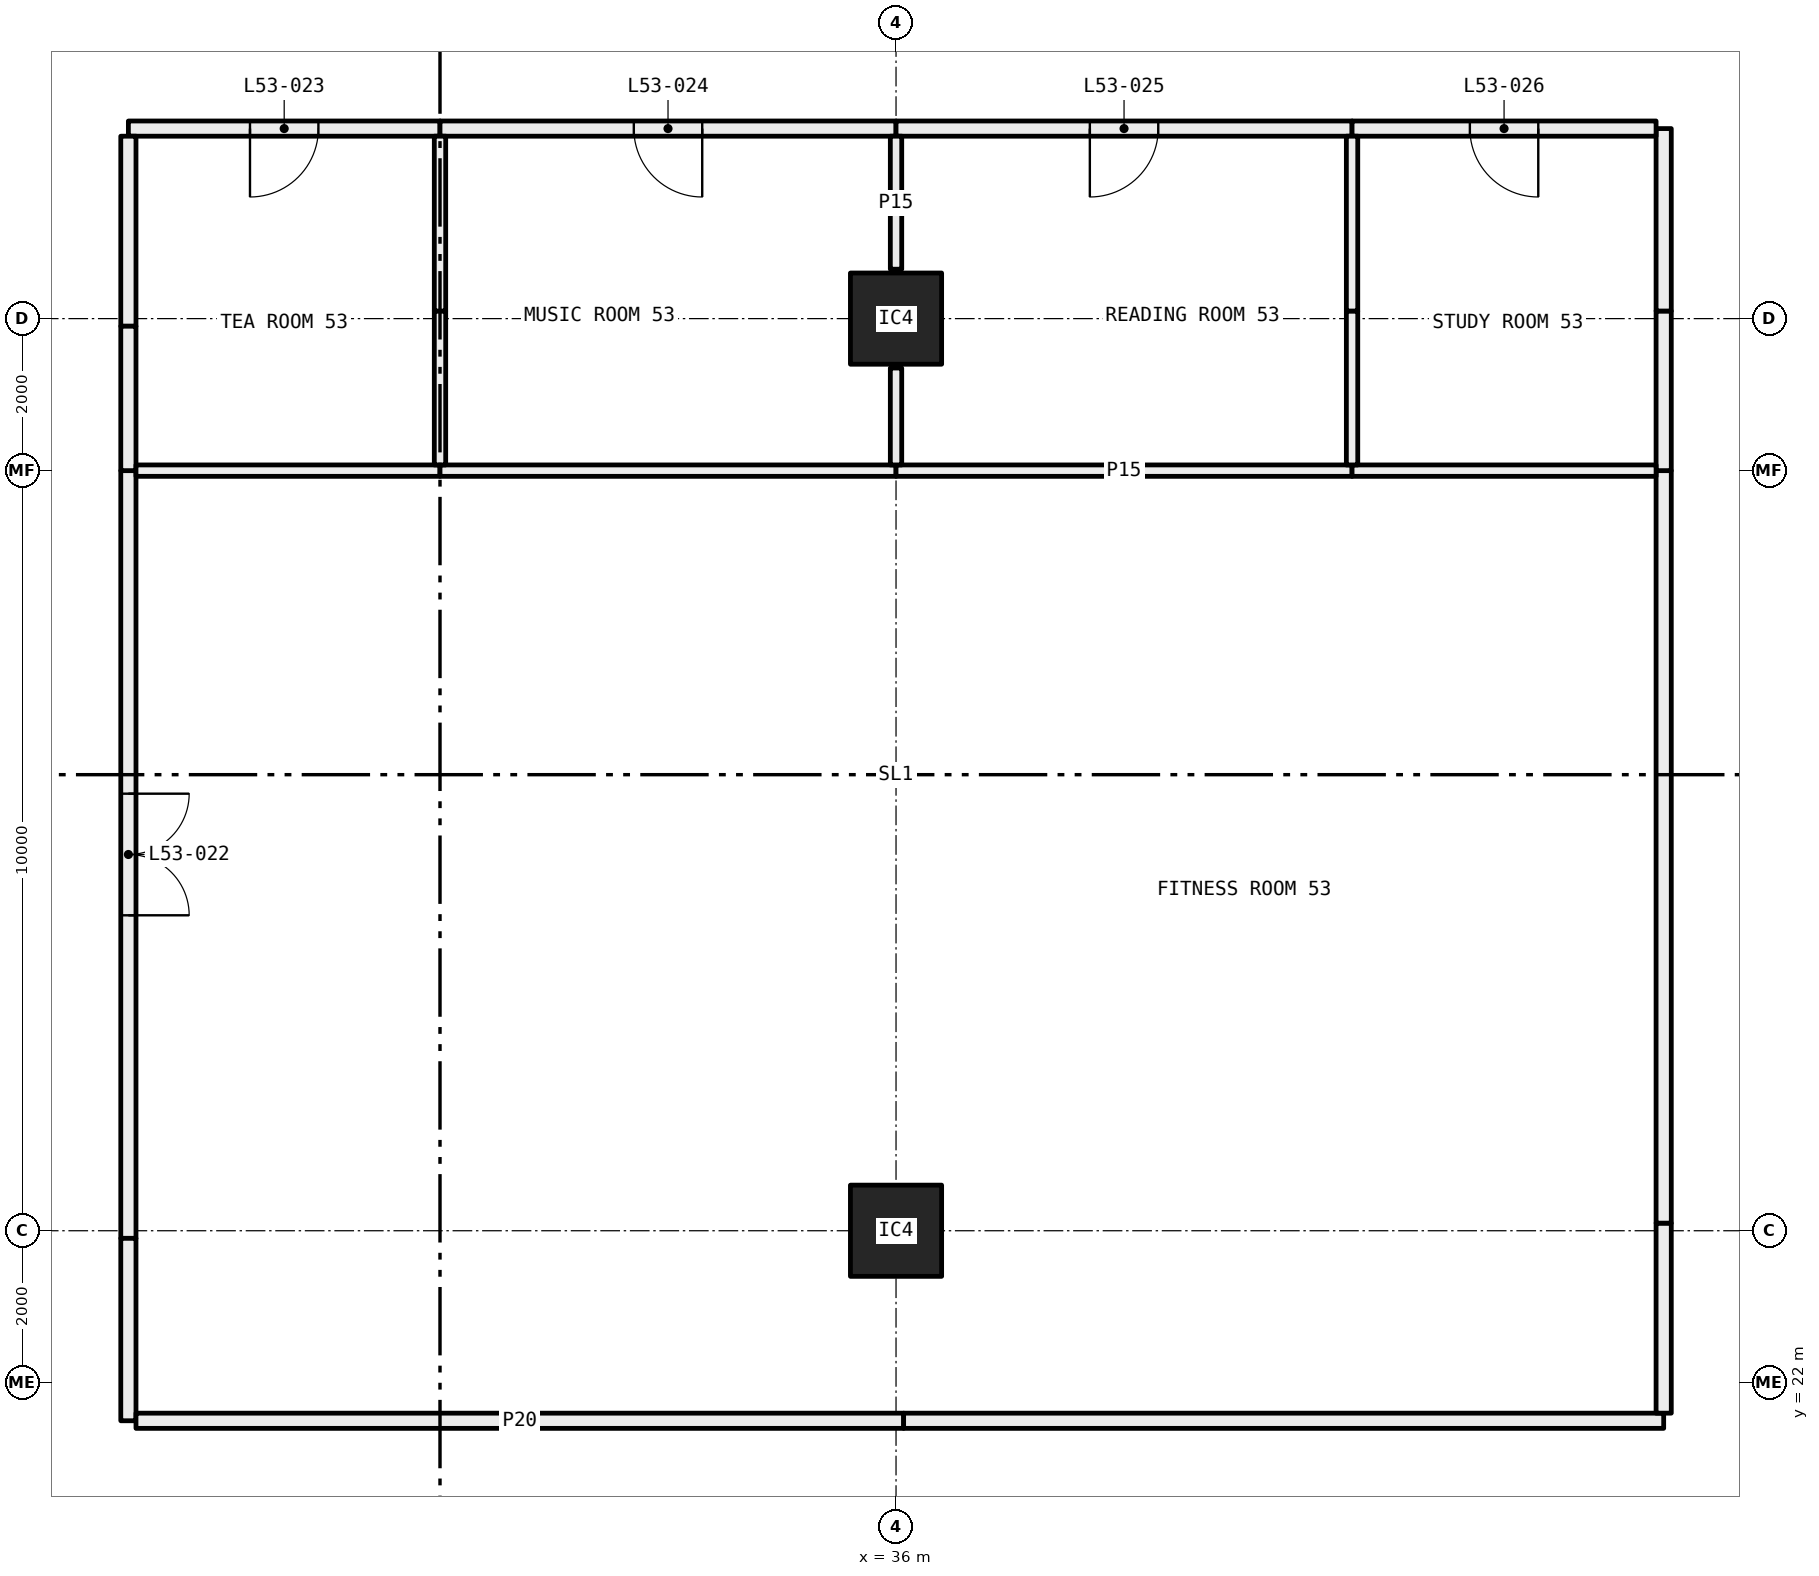
"""IFC4 building model, lengths in metres.
Left out: names, types, materials, properties, quantities, classifications, styles, units other than length and angle.
Written with IfcOpenShell. Run it as: python <this file> out.ifc"""

import sys

from ifc_helpers import new_model, si_unit, direction, frame, frame_2d, origin, origin_2d, place, context, subcontext, project, spatial, rectangle, hollow_rectangle, extrude, element, fill, save


model = new_model("IFC4")
c1 = context("Model", 3, precision=1e-05, world=origin(), true_north=direction((0.0, 1.0)))
c2 = subcontext(c1, "Body", "Model", "MODEL_VIEW")
j1 = project(units=[si_unit("LENGTHUNIT", "METRE"), si_unit("PLANEANGLEUNIT", "RADIAN")], contexts=[c1])
p1 = place(None, origin())
s1 = spatial("IfcSite", under=j1, at=p1, CompositionType="ELEMENT")
p2 = place(p1, origin())
s2 = spatial("IfcBuilding", under=s1, at=p2, CompositionType="ELEMENT")
p3 = place(p2, frame((0.0, 0.0, 199.65)))
s3 = spatial("IfcBuildingStorey", under=s2, at=p3, CompositionType="ELEMENT", Elevation=199.65)
for number, where, z_axis, x_axis in (
    (1, (36.0, 24.0, 0.0), (0.0, 0.0, 1.0), (1.0, 0.0, 0.0)),
    (2, (36.0, 36.0, 0.0), (0.0, 0.0, 1.0), (1.0, 0.0, 0.0)),
):
    element("IfcColumn", number, at=place(p3, frame(where, z_axis=z_axis, x_axis=x_axis)), inside=s3, PredefinedType="COLUMN", context=c2, shape_type="SweptSolid", body=[
        extrude(hollow_rectangle(XDim=1.2, YDim=1.2, WallThickness=0.05, at=origin_2d()), origin(), (0.0, 0.0, 1.0), 3.05),
    ])
p4 = place(p3, frame((25.9, 34.0, 0.0), z_axis=(0.0, 0.0, 1.0), x_axis=(0.0, -1.0, 0.0)))
e3 = element("IfcWall", 3, at=p4, inside=s3, PredefinedType="PARTITIONING", context=c2, shape_type="SweptSolid", body=[
    extrude(rectangle(XDim=10.1, YDim=0.2, at=frame_2d((5.05, 0.0))), origin(), (0.0, 0.0, 1.0), 2.45),
])
p5 = place(p4, frame((4.25, 0.0, 0.0)))
e4 = element("IfcOpeningElement", 4, at=p5, cuts=e3, PredefinedType="OPENING", context=c2, shape_type="SweptSolid", body=[
    extrude(rectangle(XDim=1.6, YDim=2.1, at=frame_2d((0.8, 1.05))), frame((0.0, 0.11, 0.0), z_axis=(0.0, -1.0, 0.0), x_axis=(1.0, 0.0, 0.0)), (0.0, 0.0, 1.0), 0.22),
])
p6 = place(p3, frame((25.9, 23.9, 0.0), z_axis=(0.0, 0.0, 1.0), x_axis=(0.0, -1.0, 0.0)))
e5 = element("IfcWall", 5, at=p6, inside=s3, PredefinedType="PARTITIONING", context=c2, shape_type="SweptSolid", body=[
    extrude(rectangle(XDim=2.4, YDim=0.2, at=frame_2d((1.2, 0.0))), origin(), (0.0, 0.0, 1.0), 3.05),
])
p7 = place(p3, frame((26.0, 21.5, 0.0), z_axis=(0.0, 0.0, 1.0), x_axis=(1.0, 0.0, 0.0)))
e6 = element("IfcWall", 6, at=p7, inside=s3, PredefinedType="PARTITIONING", context=c2, shape_type="SweptSolid", body=[
    extrude(rectangle(XDim=10.1, YDim=0.2, at=frame_2d((5.05, 0.0))), origin(), (0.0, 0.0, 1.0), 2.45),
])
p8 = place(p3, frame((36.1, 21.5, 0.0), z_axis=(0.0, 0.0, 1.0), x_axis=(1.0, 0.0, 0.0)))
e7 = element("IfcWall", 7, at=p8, inside=s3, PredefinedType="PARTITIONING", context=c2, shape_type="SweptSolid", body=[
    extrude(rectangle(XDim=10.0, YDim=0.2, at=frame_2d((5.0, 0.0))), origin(), (0.0, 0.0, 1.0), 3.05),
])
p9 = place(p3, frame((46.1, 21.6, 0.0), z_axis=(0.0, 0.0, 1.0), x_axis=(0.0, 1.0, 0.0)))
e8 = element("IfcWall", 8, at=p9, inside=s3, PredefinedType="PARTITIONING", context=c2, shape_type="SweptSolid", body=[
    extrude(rectangle(XDim=2.5, YDim=0.2, at=frame_2d((1.25, 0.0))), origin(), (0.0, 0.0, 1.0), 2.45),
])
p10 = place(p3, frame((46.1, 24.1, 0.0), z_axis=(0.0, 0.0, 1.0), x_axis=(0.0, 1.0, 0.0)))
e9 = element("IfcWall", 9, at=p10, inside=s3, PredefinedType="PARTITIONING", context=c2, shape_type="SweptSolid", body=[
    extrude(rectangle(XDim=9.9, YDim=0.2, at=frame_2d((4.95, 0.0))), origin(), (0.0, 0.0, 1.0), 3.05),
])
p11 = place(p3, frame((30.0, 38.5, 0.0), z_axis=(0.0, 0.0, 1.0), x_axis=(-1.0, 0.0, 0.0)))
e10 = element("IfcWall", 10, at=p11, inside=s3, PredefinedType="PARTITIONING", context=c2, shape_type="SweptSolid", body=[
    extrude(rectangle(XDim=4.1, YDim=0.2, at=frame_2d((2.05, 0.0))), origin(), (0.0, 0.0, 1.0), 3.05),
])
p12 = place(p11, frame((1.6, 0.0, 0.0)))
e11 = element("IfcOpeningElement", 11, at=p12, cuts=e10, PredefinedType="OPENING", context=c2, shape_type="SweptSolid", body=[
    extrude(rectangle(XDim=0.9, YDim=2.1, at=frame_2d((0.45, 1.05))), frame((0.0, 0.11, 0.0), z_axis=(0.0, -1.0, 0.0), x_axis=(1.0, 0.0, 0.0)), (0.0, 0.0, 1.0), 0.22),
])
p13 = place(p3, frame((25.9, 38.4, 0.0), z_axis=(0.0, 0.0, 1.0), x_axis=(0.0, -1.0, 0.0)))
e12 = element("IfcWall", 12, at=p13, inside=s3, PredefinedType="PARTITIONING", context=c2, shape_type="SweptSolid", body=[
    extrude(rectangle(XDim=2.5, YDim=0.2, at=frame_2d((1.25, 0.0))), origin(), (0.0, 0.0, 1.0), 2.45),
])
p14 = place(p3, frame((25.9, 35.9, 0.0), z_axis=(0.0, 0.0, 1.0), x_axis=(0.0, -1.0, 0.0)))
e13 = element("IfcWall", 13, at=p14, inside=s3, PredefinedType="PARTITIONING", context=c2, shape_type="SweptSolid", body=[
    extrude(rectangle(XDim=1.9, YDim=0.2, at=frame_2d((0.95, 0.0))), origin(), (0.0, 0.0, 1.0), 3.05),
])
p15 = place(p3, frame((36.0, 38.5, 0.0), z_axis=(0.0, 0.0, 1.0), x_axis=(-1.0, 0.0, 0.0)))
e14 = element("IfcWall", 14, at=p15, inside=s3, PredefinedType="PARTITIONING", context=c2, shape_type="SweptSolid", body=[
    extrude(rectangle(XDim=6.0, YDim=0.2, at=frame_2d((3.0, 0.0))), origin(), (0.0, 0.0, 1.0), 2.45),
])
p16 = place(p15, frame((2.55, 0.0, 0.0)))
e15 = element("IfcOpeningElement", 15, at=p16, cuts=e14, PredefinedType="OPENING", context=c2, shape_type="SweptSolid", body=[
    extrude(rectangle(XDim=0.9, YDim=2.1, at=frame_2d((0.45, 1.05))), frame((0.0, 0.11, 0.0), z_axis=(0.0, -1.0, 0.0), x_axis=(1.0, 0.0, 0.0)), (0.0, 0.0, 1.0), 0.22),
])
p17 = place(p3, frame((42.0, 38.5, 0.0), z_axis=(0.0, 0.0, 1.0), x_axis=(-1.0, 0.0, 0.0)))
e16 = element("IfcWall", 16, at=p17, inside=s3, PredefinedType="PARTITIONING", context=c2, shape_type="SweptSolid", body=[
    extrude(rectangle(XDim=6.0, YDim=0.2, at=frame_2d((3.0, 0.0))), origin(), (0.0, 0.0, 1.0), 2.45),
])
p18 = place(p17, frame((2.55, 0.0, 0.0)))
e17 = element("IfcOpeningElement", 17, at=p18, cuts=e16, PredefinedType="OPENING", context=c2, shape_type="SweptSolid", body=[
    extrude(rectangle(XDim=0.9, YDim=2.1, at=frame_2d((0.45, 1.05))), frame((0.0, 0.11, 0.0), z_axis=(0.0, -1.0, 0.0), x_axis=(1.0, 0.0, 0.0)), (0.0, 0.0, 1.0), 0.22),
])
p19 = place(p3, frame((46.1, 34.0, 0.0), z_axis=(0.0, 0.0, 1.0), x_axis=(0.0, 1.0, 0.0)))
e18 = element("IfcWall", 18, at=p19, inside=s3, PredefinedType="PARTITIONING", context=c2, shape_type="SweptSolid", body=[
    extrude(rectangle(XDim=2.1, YDim=0.2, at=frame_2d((1.05, 0.0))), origin(), (0.0, 0.0, 1.0), 2.45),
])
p20 = place(p3, frame((46.1, 36.1, 0.0), z_axis=(0.0, 0.0, 1.0), x_axis=(0.0, 1.0, 0.0)))
e19 = element("IfcWall", 19, at=p20, inside=s3, PredefinedType="PARTITIONING", context=c2, shape_type="SweptSolid", body=[
    extrude(rectangle(XDim=2.4, YDim=0.2, at=frame_2d((1.2, 0.0))), origin(), (0.0, 0.0, 1.0), 3.05),
])
p21 = place(p3, frame((46.0, 38.5, 0.0), z_axis=(0.0, 0.0, 1.0), x_axis=(-1.0, 0.0, 0.0)))
e20 = element("IfcWall", 20, at=p21, inside=s3, PredefinedType="PARTITIONING", context=c2, shape_type="SweptSolid", body=[
    extrude(rectangle(XDim=4.0, YDim=0.2, at=frame_2d((2.0, 0.0))), origin(), (0.0, 0.0, 1.0), 3.05),
])
p22 = place(p21, frame((1.55, 0.0, 0.0)))
e21 = element("IfcOpeningElement", 21, at=p22, cuts=e20, PredefinedType="OPENING", context=c2, shape_type="SweptSolid", body=[
    extrude(rectangle(XDim=0.9, YDim=2.1, at=frame_2d((0.45, 1.05))), frame((0.0, 0.11, 0.0), z_axis=(0.0, -1.0, 0.0), x_axis=(1.0, 0.0, 0.0)), (0.0, 0.0, 1.0), 0.22),
])
p23 = place(p3, frame((30.0, 34.0, 0.0), z_axis=(0.0, 0.0, 1.0), x_axis=(-1.0, 0.0, 0.0)))
e22 = element("IfcWall", 22, at=p23, inside=s3, PredefinedType="PARTITIONING", context=c2, shape_type="SweptSolid", body=[
    extrude(rectangle(XDim=4.0, YDim=0.15, at=frame_2d((2.0, 0.0))), origin(), (0.0, 0.0, 1.0), 3.05),
])
for number, where, z_axis, x_axis in (
    (23, (36.0, 34.0, 0.0), (0.0, 0.0, 1.0), (-1.0, 0.0, 0.0)),
    (24, (42.0, 34.0, 0.0), (0.0, 0.0, 1.0), (-1.0, 0.0, 0.0)),
):
    element("IfcWall", number, at=place(p3, frame(where, z_axis=z_axis, x_axis=x_axis)), inside=s3, PredefinedType="PARTITIONING", context=c2, shape_type="SweptSolid", body=[
        extrude(rectangle(XDim=6.0, YDim=0.15, at=frame_2d((3.0, 0.0))), origin(), (0.0, 0.0, 1.0), 2.45),
    ])
p24 = place(p3, frame((46.0, 34.0, 0.0), z_axis=(0.0, 0.0, 1.0), x_axis=(-1.0, 0.0, 0.0)))
e25 = element("IfcWall", 25, at=p24, inside=s3, PredefinedType="PARTITIONING", context=c2, shape_type="SweptSolid", body=[
    extrude(rectangle(XDim=4.0, YDim=0.15, at=frame_2d((2.0, 0.0))), origin(), (0.0, 0.0, 1.0), 3.05),
])
p25 = place(p3, frame((30.0, 34.075, 0.0), z_axis=(0.0, 0.0, 1.0), x_axis=(0.0, 1.0, 0.0)))
e26 = element("IfcWall", 26, at=p25, inside=s3, PredefinedType="PARTITIONING", context=c2, shape_type="SweptSolid", body=[
    extrude(rectangle(XDim=2.025, YDim=0.15, at=frame_2d((1.013, 0.0))), origin(), (0.0, 0.0, 1.0), 2.45),
])
p26 = place(p3, frame((30.0, 36.1, 0.0), z_axis=(0.0, 0.0, 1.0), x_axis=(0.0, 1.0, 0.0)))
e27 = element("IfcWall", 27, at=p26, inside=s3, PredefinedType="PARTITIONING", context=c2, shape_type="SweptSolid", body=[
    extrude(rectangle(XDim=2.3, YDim=0.15, at=frame_2d((1.15, 0.0))), origin(), (0.0, 0.0, 1.0), 3.05),
])
p27 = place(p3, frame((36.0, 34.075, 0.0), z_axis=(0.0, 0.0, 1.0), x_axis=(0.0, 1.0, 0.0)))
e28 = element("IfcWall", 28, at=p27, inside=s3, PredefinedType="PARTITIONING", context=c2, shape_type="SweptSolid", body=[
    extrude(rectangle(XDim=1.275, YDim=0.15, at=frame_2d((0.638, 0.0))), origin(), (0.0, 0.0, 1.0), 2.45),
])
p28 = place(p3, frame((36.0, 36.65, 0.0), z_axis=(0.0, 0.0, 1.0), x_axis=(0.0, 1.0, 0.0)))
e29 = element("IfcWall", 29, at=p28, inside=s3, PredefinedType="PARTITIONING", context=c2, shape_type="SweptSolid", body=[
    extrude(rectangle(XDim=1.75, YDim=0.15, at=frame_2d((0.875, 0.0))), origin(), (0.0, 0.0, 1.0), 2.45),
])
p29 = place(p3, frame((42.0, 34.075, 0.0), z_axis=(0.0, 0.0, 1.0), x_axis=(0.0, 1.0, 0.0)))
e30 = element("IfcWall", 30, at=p29, inside=s3, PredefinedType="PARTITIONING", context=c2, shape_type="SweptSolid", body=[
    extrude(rectangle(XDim=2.025, YDim=0.15, at=frame_2d((1.013, 0.0))), origin(), (0.0, 0.0, 1.0), 2.45),
])
p30 = place(p3, frame((42.0, 36.1, 0.0), z_axis=(0.0, 0.0, 1.0), x_axis=(0.0, 1.0, 0.0)))
e31 = element("IfcWall", 31, at=p30, inside=s3, PredefinedType="PARTITIONING", context=c2, shape_type="SweptSolid", body=[
    extrude(rectangle(XDim=2.3, YDim=0.15, at=frame_2d((1.15, 0.0))), origin(), (0.0, 0.0, 1.0), 3.05),
])
p31 = place(p5, origin())
e32 = element("IfcDoor", 32, at=p31, inside=s3, OperationType="DOUBLE_DOOR_SINGLE_SWING", PredefinedType="DOOR", context=c2, shape_type="SweptSolid", body=[
    extrude(rectangle(XDim=1.6, YDim=2.1, at=frame_2d((0.8, 1.05))), frame((0.0, 0.025, 0.0), z_axis=(0.0, -1.0, 0.0), x_axis=(1.0, 0.0, 0.0)), (0.0, 0.0, 1.0), 0.05),
])
fill(e4, e32)
p32 = place(p12, origin())
e33 = element("IfcDoor", 33, at=p32, inside=s3, OperationType="SINGLE_SWING_LEFT", PredefinedType="DOOR", context=c2, shape_type="SweptSolid", body=[
    extrude(rectangle(XDim=0.9, YDim=2.1, at=frame_2d((0.45, 1.05))), frame((0.0, 0.025, 0.0), z_axis=(0.0, -1.0, 0.0), x_axis=(1.0, 0.0, 0.0)), (0.0, 0.0, 1.0), 0.05),
])
fill(e11, e33)
p33 = place(p16, origin())
e34 = element("IfcDoor", 34, at=p33, inside=s3, OperationType="SINGLE_SWING_RIGHT", PredefinedType="DOOR", context=c2, shape_type="SweptSolid", body=[
    extrude(rectangle(XDim=0.9, YDim=2.1, at=frame_2d((0.45, 1.05))), frame((0.0, 0.025, 0.0), z_axis=(0.0, -1.0, 0.0), x_axis=(1.0, 0.0, 0.0)), (0.0, 0.0, 1.0), 0.05),
])
fill(e15, e34)
p34 = place(p18, origin())
e35 = element("IfcDoor", 35, at=p34, inside=s3, OperationType="SINGLE_SWING_LEFT", PredefinedType="DOOR", context=c2, shape_type="SweptSolid", body=[
    extrude(rectangle(XDim=0.9, YDim=2.1, at=frame_2d((0.45, 1.05))), frame((0.0, 0.025, 0.0), z_axis=(0.0, -1.0, 0.0), x_axis=(1.0, 0.0, 0.0)), (0.0, 0.0, 1.0), 0.05),
])
fill(e17, e35)
p35 = place(p22, origin())
e36 = element("IfcDoor", 36, at=p35, inside=s3, OperationType="SINGLE_SWING_RIGHT", PredefinedType="DOOR", context=c2, shape_type="SweptSolid", body=[
    extrude(rectangle(XDim=0.9, YDim=2.1, at=frame_2d((0.45, 1.05))), frame((0.0, 0.025, 0.0), z_axis=(0.0, -1.0, 0.0), x_axis=(1.0, 0.0, 0.0)), (0.0, 0.0, 1.0), 0.05),
])
fill(e21, e36)
save(model, sys.argv[1])
